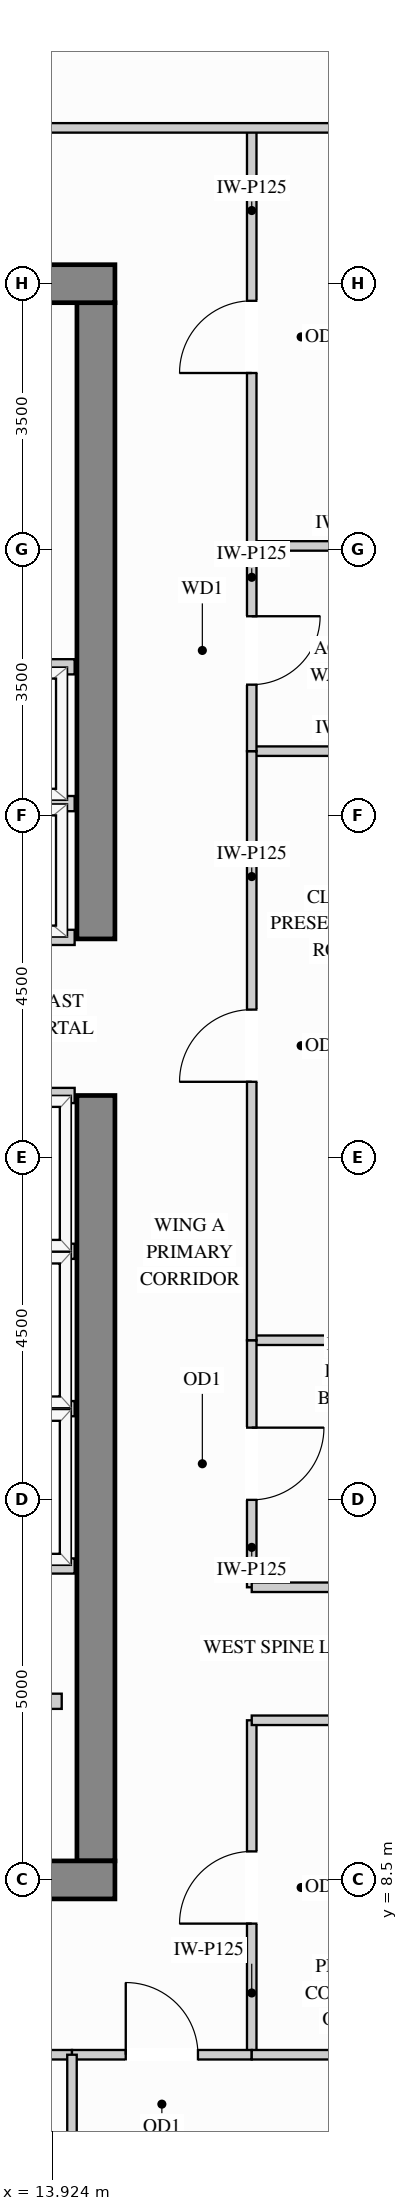
"""IFC4 building model, lengths in metres.
Left out: names, types, materials, properties, quantities, classifications, styles, units other than length and angle.
Written with IfcOpenShell. Run it as: python <this file> out.ifc"""

import sys

from ifc_helpers import new_model, si_unit, direction, frame, frame_2d, origin, place, context, subcontext, project, spatial, rectangle, extrude, source, transform, mapped, element, fill, save


model = new_model("IFC4")
c1 = context("Model", 3, precision=1e-05, world=origin(), true_north=direction((0.0, 1.0)))
c2 = subcontext(c1, "Body", "Model", "MODEL_VIEW")
j1 = project(units=[si_unit("LENGTHUNIT", "METRE"), si_unit("PLANEANGLEUNIT", "RADIAN")], contexts=[c1])
p1 = place(None, origin())
s1 = spatial("IfcSite", under=j1, at=p1, CompositionType="ELEMENT")
p2 = place(p1, origin())
s2 = spatial("IfcBuilding", under=s1, at=p2, CompositionType="ELEMENT")
p3 = place(p2, frame((0.0, 0.0, 241.2)))
s3 = spatial("IfcBuildingStorey", under=s2, at=p3, CompositionType="ELEMENT", Elevation=241.2)
m1 = source(origin(), c2, "Body", "SweptSolid", [
    extrude(rectangle(XDim=10.07, YDim=0.5, at=frame_2d((5.035, 0.0))), origin(), (0.0, 0.0, 1.0), 3.4),
])
p4 = place(p3, frame((14.5, 8.75, 0.0), z_axis=(0.0, 0.0, 1.0), x_axis=(0.0, 1.0, 0.0)))
e1 = element("IfcWall", 1, at=p4, inside=s3, PredefinedType="SHEAR", context=c2, shape_type="MappedRepresentation", body=[
    mapped(m1, transform((0.0, 0.0, 0.0), x_axis=(1.0, 0.0, 0.0), y_axis=(0.0, 1.0, 0.0), z_axis=(0.0, 0.0, 1.0))),
])
m2 = source(origin(), c2, "Body", "SweptSolid", [
    extrude(rectangle(XDim=8.37, YDim=0.5, at=frame_2d((4.185, 0.0))), origin(), (0.0, 0.0, 1.0), 3.4),
])
p5 = place(p3, frame((14.5, 20.88, 0.0), z_axis=(0.0, 0.0, 1.0), x_axis=(0.0, 1.0, 0.0)))
e2 = element("IfcWall", 2, at=p5, inside=s3, PredefinedType="SHEAR", context=c2, shape_type="MappedRepresentation", body=[
    mapped(m2, transform((0.0, 0.0, 0.0), x_axis=(1.0, 0.0, 0.0), y_axis=(0.0, 1.0, 0.0), z_axis=(0.0, 0.0, 1.0))),
])
m3 = source(origin(), c2, "Body", "SweptSolid", [
    extrude(rectangle(XDim=10.5, YDim=0.5, at=frame_2d((5.25, 0.0))), origin(), (0.0, 0.0, 1.0), 3.4),
])
for number, where, z_axis, x_axis in (
    (3, (4.25, 29.5, 0.0), (0.0, 0.0, 1.0), (1.0, 0.0, 0.0)),
    (4, (4.25, 8.5, 0.0), (0.0, 0.0, 1.0), (1.0, 0.0, 0.0)),
):
    element("IfcWall", number, at=place(p3, frame(where, z_axis=z_axis, x_axis=x_axis)), inside=s3, PredefinedType="SHEAR", context=c2, shape_type="MappedRepresentation", body=[
        mapped(m3, transform((0.0, 0.0, 0.0), x_axis=(1.0, 0.0, 0.0), y_axis=(0.0, 1.0, 0.0), z_axis=(0.0, 0.0, 1.0))),
    ])
m4 = source(origin(), c2, "Body", "SweptSolid", [
    extrude(rectangle(XDim=2.6, YDim=0.125, at=frame_2d((1.3, 0.0))), origin(), (0.0, 0.0, 1.0), 3.385),
])
p6 = place(p3, frame((16.55, 15.6, 0.0), z_axis=(0.0, 0.0, 1.0), x_axis=(1.0, 0.0, 0.0)))
e5 = element("IfcWall", 5, at=p6, inside=s3, PredefinedType="PARTITIONING", context=c2, shape_type="MappedRepresentation", body=[
    mapped(m4, transform((0.0, 0.0, 0.0), x_axis=(1.0, 0.0, 0.0), y_axis=(0.0, 1.0, 0.0), z_axis=(0.0, 0.0, 1.0))),
])
m5 = source(origin(), c2, "Body", "SweptSolid", [
    extrude(rectangle(XDim=2.598, YDim=0.125, at=frame_2d((1.299, 0.0))), origin(), (0.0, 0.0, 1.0), 3.385),
])
for number, where, z_axis, x_axis in (
    (6, (16.55, 23.35, 0.0), (0.0, 0.0, 1.0), (1.0, 0.0, 0.0)),
    (7, (16.55, 26.05, 0.0), (0.0, 0.0, 1.0), (1.0, 0.0, 0.0)),
):
    element("IfcWall", number, at=place(p3, frame(where, z_axis=z_axis, x_axis=x_axis)), inside=s3, PredefinedType="PARTITIONING", context=c2, shape_type="MappedRepresentation", body=[
        mapped(m5, transform((0.0, 0.0, 0.0), x_axis=(1.0, 0.0, 0.0), y_axis=(0.0, 1.0, 0.0), z_axis=(0.0, 0.0, 1.0))),
    ])
p7 = place(p3, frame((16.55, 12.35, 0.0), z_axis=(0.0, 0.0, 1.0), x_axis=(0.0, 1.0, 0.0)))
e8 = element("IfcWall", 8, at=p7, inside=s3, PredefinedType="PARTITIONING", context=c2, shape_type="SweptSolid", body=[
    extrude(rectangle(XDim=3.25, YDim=0.125, at=frame_2d((1.625, 0.0))), origin(), (0.0, 0.0, 1.0), 3.385),
])
p8 = place(p7, frame((1.15, 0.0, 0.0)))
e9 = element("IfcOpeningElement", 9, at=p8, cuts=e8, PredefinedType="OPENING", context=c2, shape_type="SweptSolid", body=[
    extrude(rectangle(XDim=0.95, YDim=2.15, at=frame_2d((0.475, 1.075))), frame((0.0, 0.073, 0.0), z_axis=(0.0, -1.0, 0.0), x_axis=(1.0, 0.0, 0.0)), (0.0, 0.0, 1.0), 0.145),
])
p9 = place(p3, frame((16.55, 15.6, 0.0), z_axis=(0.0, 0.0, 1.0), x_axis=(0.0, 1.0, 0.0)))
e10 = element("IfcWall", 10, at=p9, inside=s3, PredefinedType="PARTITIONING", context=c2, shape_type="SweptSolid", body=[
    extrude(rectangle(XDim=7.75, YDim=0.125, at=frame_2d((3.875, 0.0))), origin(), (0.0, 0.0, 1.0), 3.385),
])
p10 = place(p9, frame((3.4, 0.0, 0.0)))
e11 = element("IfcOpeningElement", 11, at=p10, cuts=e10, PredefinedType="OPENING", context=c2, shape_type="SweptSolid", body=[
    extrude(rectangle(XDim=0.95, YDim=2.15, at=frame_2d((0.475, 1.075))), frame((0.0, 0.073, 0.0), z_axis=(0.0, -1.0, 0.0), x_axis=(1.0, 0.0, 0.0)), (0.0, 0.0, 1.0), 0.145),
])
p11 = place(p3, frame((16.55, 26.05, 0.0), z_axis=(0.0, 0.0, 1.0), x_axis=(0.0, 1.0, 0.0)))
e12 = element("IfcWall", 12, at=p11, inside=s3, PredefinedType="PARTITIONING", context=c2, shape_type="SweptSolid", body=[
    extrude(rectangle(XDim=5.5, YDim=0.125, at=frame_2d((2.75, 0.0))), origin(), (0.0, 0.0, 1.0), 3.385),
])
p12 = place(p11, frame((2.275, 0.0, 0.0)))
e13 = element("IfcOpeningElement", 13, at=p12, cuts=e12, PredefinedType="OPENING", context=c2, shape_type="SweptSolid", body=[
    extrude(rectangle(XDim=0.95, YDim=2.15, at=frame_2d((0.475, 1.075))), frame((0.0, 0.073, 0.0), z_axis=(0.0, -1.0, 0.0), x_axis=(1.0, 0.0, 0.0)), (0.0, 0.0, 1.0), 0.145),
])
p13 = place(p3, frame((16.55, 6.2, 0.0), z_axis=(0.0, 0.0, 1.0), x_axis=(0.0, 1.0, 0.0)))
e14 = element("IfcWall", 14, at=p13, inside=s3, PredefinedType="PARTITIONING", context=c2, shape_type="SweptSolid", body=[
    extrude(rectangle(XDim=4.4, YDim=0.125, at=frame_2d((2.2, 0.0))), origin(), (0.0, 0.0, 1.0), 3.385),
])
p14 = place(p13, frame((1.725, 0.0, 0.0)))
e15 = element("IfcOpeningElement", 15, at=p14, cuts=e14, PredefinedType="OPENING", context=c2, shape_type="SweptSolid", body=[
    extrude(rectangle(XDim=0.95, YDim=2.15, at=frame_2d((0.475, 1.075))), frame((0.0, 0.073, 0.0), z_axis=(0.0, -1.0, 0.0), x_axis=(1.0, 0.0, 0.0)), (0.0, 0.0, 1.0), 0.145),
])
p15 = place(p3, frame((16.55, 23.35, 0.0), z_axis=(0.0, 0.0, 1.0), x_axis=(0.0, 1.0, 0.0)))
e16 = element("IfcWall", 16, at=p15, inside=s3, PredefinedType="PARTITIONING", context=c2, shape_type="SweptSolid", body=[
    extrude(rectangle(XDim=2.7, YDim=0.125, at=frame_2d((1.35, 0.0))), origin(), (0.0, 0.0, 1.0), 3.385),
])
p16 = place(p15, frame((0.875, 0.0, 0.0)))
e17 = element("IfcOpeningElement", 17, at=p16, cuts=e16, PredefinedType="OPENING", context=c2, shape_type="SweptSolid", body=[
    extrude(rectangle(XDim=0.9, YDim=2.15, at=frame_2d((0.45, 1.075))), frame((0.0, 0.073, 0.0), z_axis=(0.0, -1.0, 0.0), x_axis=(1.0, 0.0, 0.0)), (0.0, 0.0, 1.0), 0.145),
])
m6 = source(origin(), c2, "Body", "SweptSolid", [
    extrude(rectangle(XDim=12.598, YDim=0.125, at=frame_2d((6.299, 0.0))), origin(), (0.0, 0.0, 1.0), 3.385),
])
p17 = place(p3, frame((6.55, 31.55, 0.0), z_axis=(0.0, 0.0, 1.0), x_axis=(1.0, 0.0, 0.0)))
e18 = element("IfcWall", 18, at=p17, inside=s3, PredefinedType="PARTITIONING", context=c2, shape_type="MappedRepresentation", body=[
    mapped(m6, transform((0.0, 0.0, 0.0), x_axis=(1.0, 0.0, 0.0), y_axis=(0.0, 1.0, 0.0), z_axis=(0.0, 0.0, 1.0))),
])
m7 = source(origin(), c2, "Body", "SweptSolid", [
    extrude(rectangle(XDim=2.95, YDim=0.125, at=frame_2d((1.475, 0.0))), origin(), (0.0, 0.0, 1.0), 3.385),
])
for number, where, z_axis, x_axis in (
    (19, (16.55, 12.35, 0.0), (0.0, 0.0, 1.0), (1.0, 0.0, 0.0)),
    (20, (16.55, 10.6, 0.0), (0.0, 0.0, 1.0), (1.0, 0.0, 0.0)),
):
    element("IfcWall", number, at=place(p3, frame(where, z_axis=z_axis, x_axis=x_axis)), inside=s3, PredefinedType="PARTITIONING", context=c2, shape_type="MappedRepresentation", body=[
        mapped(m7, transform((0.0, 0.0, 0.0), x_axis=(1.0, 0.0, 0.0), y_axis=(0.0, 1.0, 0.0), z_axis=(0.0, 0.0, 1.0))),
    ])
p18 = place(p3, frame((10.544, 6.2, 0.0), z_axis=(0.0, 0.0, 1.0), x_axis=(1.0, 0.0, 0.0)))
e21 = element("IfcWall", 21, at=p18, inside=s3, PredefinedType="PARTITIONING", context=c2, shape_type="SweptSolid", body=[
    extrude(rectangle(XDim=3.641, YDim=0.125, at=frame_2d((1.821, 0.0))), origin(), (0.0, 0.0, 1.0), 2.848),
])
p19 = place(p18, frame((1.345, 0.0, 0.0)))
e22 = element("IfcOpeningElement", 22, at=p19, cuts=e21, PredefinedType="OPENING", context=c2, shape_type="SweptSolid", body=[
    extrude(rectangle(XDim=0.95, YDim=2.15, at=frame_2d((0.475, 1.075))), frame((0.0, 0.073, 0.0), z_axis=(0.0, -1.0, 0.0), x_axis=(1.0, 0.0, 0.0)), (0.0, 0.0, 1.0), 0.145),
])
p20 = place(p3, frame((14.185, 6.2, 0.0), z_axis=(0.0, 0.0, 1.0), x_axis=(1.0, 0.0, 0.0)))
e23 = element("IfcWall", 23, at=p20, inside=s3, PredefinedType="PARTITIONING", context=c2, shape_type="SweptSolid", body=[
    extrude(rectangle(XDim=2.365, YDim=0.125, at=frame_2d((1.183, 0.0))), origin(), (0.0, 0.0, 1.0), 2.848),
])
p21 = place(p20, frame((0.708, 0.0, 0.0)))
e24 = element("IfcOpeningElement", 24, at=p21, cuts=e23, PredefinedType="OPENING", context=c2, shape_type="SweptSolid", body=[
    extrude(rectangle(XDim=0.95, YDim=2.15, at=frame_2d((0.475, 1.075))), frame((0.0, 0.073, 0.0), z_axis=(0.0, -1.0, 0.0), x_axis=(1.0, 0.0, 0.0)), (0.0, 0.0, 1.0), 0.145),
])
m8 = source(origin(), c2, "Body", "SweptSolid", [
    extrude(rectangle(XDim=2.598, YDim=0.125, at=frame_2d((1.299, 0.0))), origin(), (0.0, 0.0, 1.0), 2.848),
])
p22 = place(p3, frame((16.55, 6.2, 0.0), z_axis=(0.0, 0.0, 1.0), x_axis=(1.0, 0.0, 0.0)))
e25 = element("IfcWall", 25, at=p22, inside=s3, PredefinedType="PARTITIONING", context=c2, shape_type="MappedRepresentation", body=[
    mapped(m8, transform((0.0, 0.0, 0.0), x_axis=(1.0, 0.0, 0.0), y_axis=(0.0, 1.0, 0.0), z_axis=(0.0, 0.0, 1.0))),
])
m9 = source(origin(), c2, "Body", "SweptSolid", [
    extrude(rectangle(XDim=5.15, YDim=0.125, at=frame_2d((2.575, 0.0))), origin(), (0.0, 0.0, 1.0), 3.385),
])
p23 = place(p3, frame((14.185, 1.05, 0.0), z_axis=(0.0, 0.0, 1.0), x_axis=(0.0, 1.0, 0.0)))
e26 = element("IfcWall", 26, at=p23, inside=s3, PredefinedType="PARTITIONING", context=c2, shape_type="MappedRepresentation", body=[
    mapped(m9, transform((0.0, 0.0, 0.0), x_axis=(1.0, 0.0, 0.0), y_axis=(0.0, 1.0, 0.0), z_axis=(0.0, 0.0, 1.0))),
])
m10 = source(origin(), c2, "Body", "SweptSolid", [
    extrude(rectangle(XDim=1.63, YDim=0.2, at=frame_2d((0.815, 0.0))), origin(), (0.0, 0.0, 1.0), 3.385),
])
p24 = place(p3, frame((12.42, 10.85, 0.0), z_axis=(0.0, 0.0, 1.0), x_axis=(1.0, 0.0, 0.0)))
e27 = element("IfcWall", 27, at=p24, inside=s3, PredefinedType="PARTITIONING", context=c2, shape_type="MappedRepresentation", body=[
    mapped(m10, transform((0.0, 0.0, 0.0), x_axis=(1.0, 0.0, 0.0), y_axis=(0.0, 1.0, 0.0), z_axis=(0.0, 0.0, 1.0))),
])
m11 = source(origin(), c2, "Body", "SweptSolid", [
    extrude(rectangle(XDim=2.39, YDim=0.2, at=frame_2d((1.195, 0.0))), origin(), (0.0, 0.0, 1.0), 3.385),
])
for number, where, z_axis, x_axis in (
    (28, (11.83, 22.66, 0.0), (0.0, 0.0, 1.0), (1.0, 0.0, 0.0)),
    (29, (11.83, 20.9, 0.0), (0.0, 0.0, 1.0), (1.0, 0.0, 0.0)),
    (30, (11.83, 24.46, 0.0), (0.0, 0.0, 1.0), (1.0, 0.0, 0.0)),
):
    element("IfcWall", number, at=place(p3, frame(where, z_axis=z_axis, x_axis=x_axis)), inside=s3, PredefinedType="PARTITIONING", context=c2, shape_type="MappedRepresentation", body=[
        mapped(m11, transform((0.0, 0.0, 0.0), x_axis=(1.0, 0.0, 0.0), y_axis=(0.0, 1.0, 0.0), z_axis=(0.0, 0.0, 1.0))),
    ])
m12 = source(origin(), c2, "Body", "SweptSolid", [
    extrude(rectangle(XDim=1.99, YDim=0.2, at=frame_2d((0.995, 0.0))), origin(), (0.0, 0.0, 1.0), 3.385),
])
for number, where, z_axis, x_axis in (
    (31, (12.23, 14.7, 0.0), (0.0, 0.0, 1.0), (1.0, 0.0, 0.0)),
    (32, (12.23, 12.63, 0.0), (0.0, 0.0, 1.0), (1.0, 0.0, 0.0)),
    (33, (12.23, 16.77, 0.0), (0.0, 0.0, 1.0), (1.0, 0.0, 0.0)),
    (34, (12.23, 18.82, 0.0), (0.0, 0.0, 1.0), (1.0, 0.0, 0.0)),
):
    element("IfcWall", number, at=place(p3, frame(where, z_axis=z_axis, x_axis=x_axis)), inside=s3, PredefinedType="PARTITIONING", context=c2, shape_type="MappedRepresentation", body=[
        mapped(m12, transform((0.0, 0.0, 0.0), x_axis=(1.0, 0.0, 0.0), y_axis=(0.0, 1.0, 0.0), z_axis=(0.0, 0.0, 1.0))),
    ])
m13 = source(origin(), c2, "Body", "SweptSolid", [
    extrude(rectangle(XDim=0.95, YDim=2.15, at=frame_2d((0.475, 1.075))), frame((0.0, 0.025, 0.0), z_axis=(0.0, -1.0, 0.0), x_axis=(1.0, 0.0, 0.0)), (0.0, 0.0, 1.0), 0.05),
])
p25 = place(p14, origin())
e35 = element("IfcDoor", 35, at=p25, inside=s3, OperationType="SINGLE_SWING_LEFT", PredefinedType="DOOR", context=c2, shape_type="MappedRepresentation", body=[
    mapped(m13, transform((0.0, 0.0, 0.0), x_axis=(1.0, 0.0, 0.0), y_axis=(0.0, 1.0, 0.0), z_axis=(0.0, 0.0, 1.0))),
])
fill(e15, e35)
p26 = place(p8, origin())
e36 = element("IfcDoor", 36, at=p26, inside=s3, OperationType="SINGLE_SWING_RIGHT", PredefinedType="DOOR", context=c2, shape_type="MappedRepresentation", body=[
    mapped(m13, transform((0.0, 0.0, 0.0), x_axis=(1.0, 0.0, 0.0), y_axis=(0.0, 1.0, 0.0), z_axis=(0.0, 0.0, 1.0))),
])
fill(e9, e36)
p27 = place(p10, origin())
e37 = element("IfcDoor", 37, at=p27, inside=s3, OperationType="SINGLE_SWING_LEFT", PredefinedType="DOOR", context=c2, shape_type="MappedRepresentation", body=[
    mapped(m13, transform((0.0, 0.0, 0.0), x_axis=(1.0, 0.0, 0.0), y_axis=(0.0, 1.0, 0.0), z_axis=(0.0, 0.0, 1.0))),
])
fill(e11, e37)
p28 = place(p12, origin())
e38 = element("IfcDoor", 38, at=p28, inside=s3, OperationType="SINGLE_SWING_LEFT", PredefinedType="DOOR", context=c2, shape_type="MappedRepresentation", body=[
    mapped(m13, transform((0.0, 0.0, 0.0), x_axis=(1.0, 0.0, 0.0), y_axis=(0.0, 1.0, 0.0), z_axis=(0.0, 0.0, 1.0))),
])
fill(e13, e38)
p29 = place(p21, origin())
e39 = element("IfcDoor", 39, at=p29, inside=s3, OperationType="SINGLE_SWING_LEFT", PredefinedType="DOOR", context=c2, shape_type="MappedRepresentation", body=[
    mapped(m13, transform((0.0, 0.0, 0.0), x_axis=(1.0, 0.0, 0.0), y_axis=(0.0, 1.0, 0.0), z_axis=(0.0, 0.0, 1.0))),
])
fill(e24, e39)
m14 = source(origin(), c2, "Body", "SweptSolid", [
    extrude(rectangle(XDim=0.9, YDim=2.15, at=frame_2d((0.45, 1.075))), frame((0.0, 0.025, 0.0), z_axis=(0.0, -1.0, 0.0), x_axis=(1.0, 0.0, 0.0)), (0.0, 0.0, 1.0), 0.05),
])
p30 = place(p16, origin())
e40 = element("IfcDoor", 40, at=p30, inside=s3, OperationType="SINGLE_SWING_RIGHT", PredefinedType="DOOR", context=c2, shape_type="MappedRepresentation", body=[
    mapped(m14, transform((0.0, 0.0, 0.0), x_axis=(1.0, 0.0, 0.0), y_axis=(0.0, 1.0, 0.0), z_axis=(0.0, 0.0, 1.0))),
])
fill(e17, e40)
save(model, sys.argv[1])
